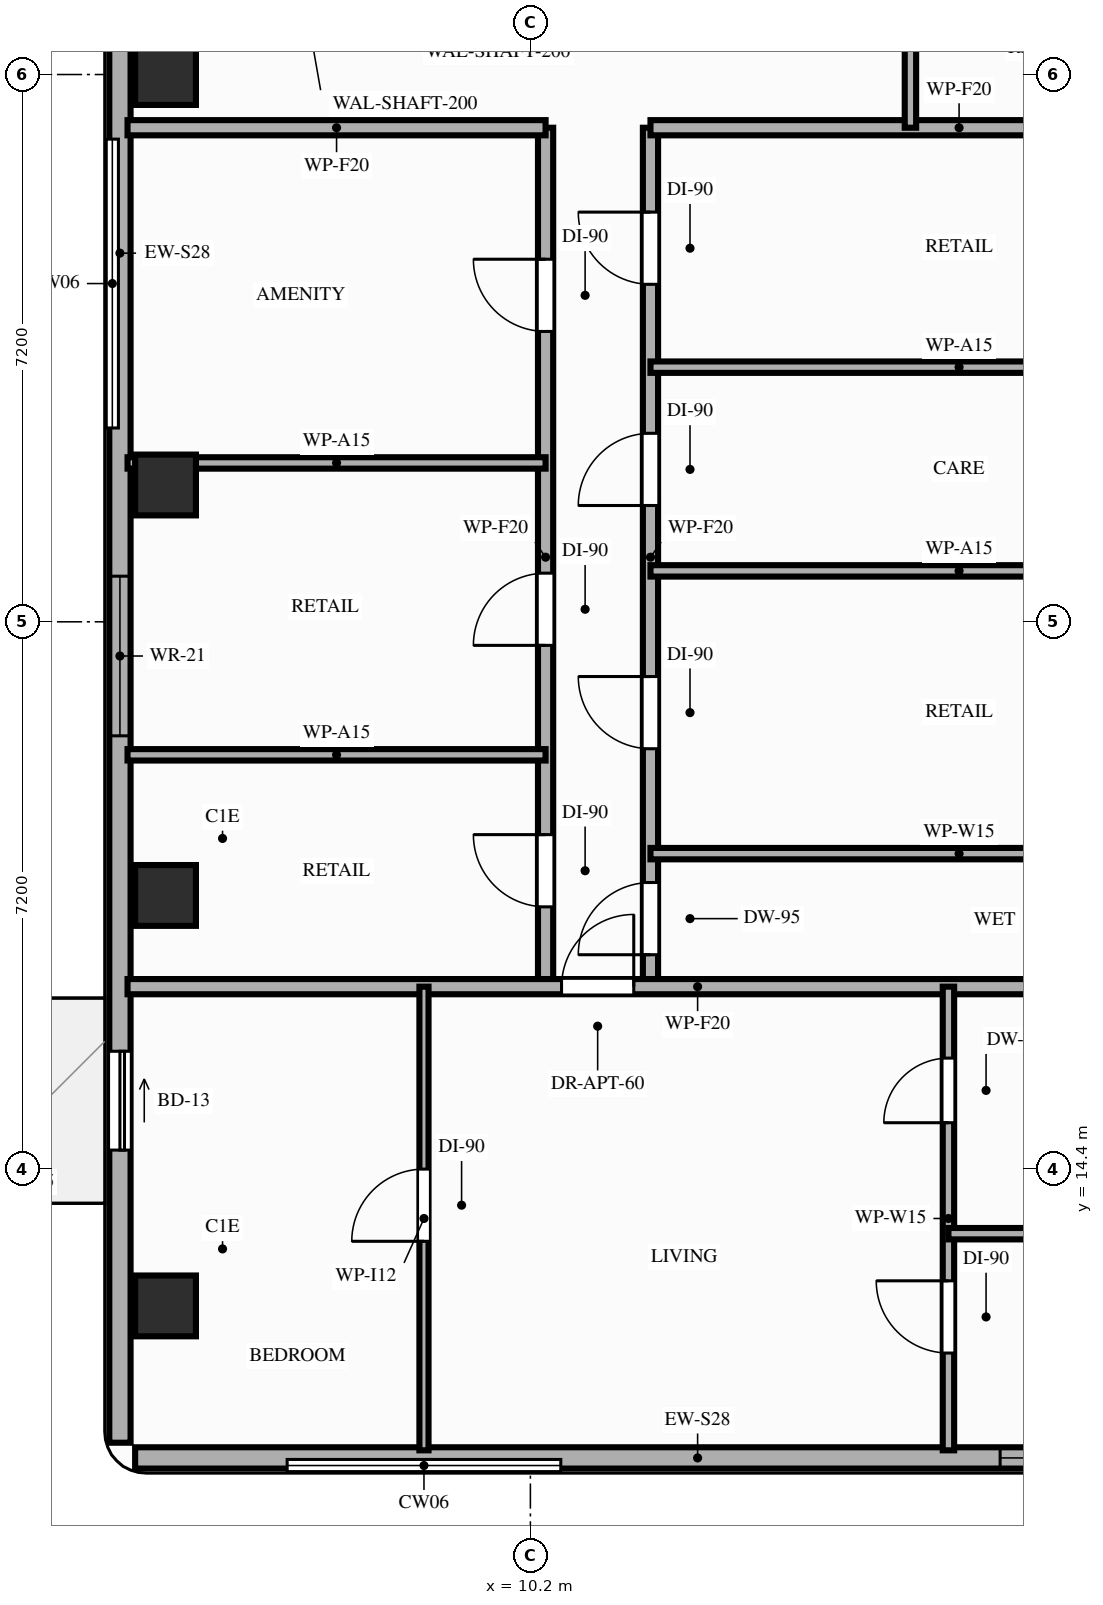
"""IFC4 building model, lengths in metres.
Left out: names, types, materials, properties, quantities, classifications, styles, units other than length and angle.
Written with IfcOpenShell. Run it as: python <this file> out.ifc"""

import sys

from ifc_helpers import new_model, si_unit, direction, frame, frame_2d, origin, origin_2d, place, context, subcontext, project, spatial, rectangle, extrude, element, fill, save


model = new_model("IFC4")
c1 = context("Model", 3, precision=1e-05, world=origin(), true_north=direction((0.0, 1.0)))
c2 = subcontext(c1, "Body", "Model", "MODEL_VIEW")
j1 = project(units=[si_unit("LENGTHUNIT", "METRE"), si_unit("PLANEANGLEUNIT", "RADIAN")], contexts=[c1])
p1 = place(None, origin())
s1 = spatial("IfcSite", under=j1, at=p1, CompositionType="ELEMENT")
p2 = place(p1, origin())
s2 = spatial("IfcBuilding", under=s1, at=p2, CompositionType="ELEMENT")
p3 = place(p2, frame((0.0, 0.0, 234.4)))
s3 = spatial("IfcBuildingStorey", under=s2, at=p3, CompositionType="ELEMENT", Elevation=234.4)
for number, where, z_axis, x_axis in (
    (1, (5.4, 12.6, 0.0), (0.0, 0.0, 1.0), (1.0, 0.0, 0.0)),
    (2, (5.4, 18.0, 0.0), (0.0, 0.0, 1.0), (1.0, 0.0, 0.0)),
    (3, (5.4, 23.4, 0.0), (0.0, 0.0, 1.0), (1.0, 0.0, 0.0)),
    (4, (5.4, 28.8, 0.0), (0.0, 0.0, 1.0), (1.0, 0.0, 0.0)),
):
    element("IfcColumn", number, at=place(p3, frame(where, z_axis=z_axis, x_axis=x_axis)), inside=s3, PredefinedType="COLUMN", context=c2, shape_type="SweptSolid", body=[
        extrude(rectangle(XDim=0.8, YDim=0.8, at=origin_2d()), origin(), (0.0, 0.0, 1.0), 3.2),
    ])
p4 = place(p3, frame((5.0, 10.6, 0.0), z_axis=(0.0, 0.0, 1.0), x_axis=(1.0, 0.0, 0.0)))
e5 = element("IfcWall", 5, at=p4, inside=s3, PredefinedType="STANDARD", context=c2, shape_type="SweptSolid", body=[
    extrude(rectangle(XDim=14.8, YDim=0.28, at=frame_2d((7.4, 0.0))), origin(), (0.0, 0.0, 1.0), 3.02),
])
p5 = place(p4, frame((11.38, 0.0, 0.85)))
e6 = element("IfcOpeningElement", 6, at=p5, cuts=e5, PredefinedType="OPENING", context=c2, shape_type="SweptSolid", body=[
    extrude(rectangle(XDim=2.6, YDim=1.92, at=frame_2d((1.3, 0.96))), frame((0.0, 0.15, 0.0), z_axis=(0.0, -1.0, 0.0), x_axis=(1.0, 0.0, 0.0)), (0.0, 0.0, 1.0), 0.3),
])
p6 = place(p3, frame((4.8, 42.1, 0.0), z_axis=(0.0, 0.0, 1.0), x_axis=(0.0, -1.0, 0.0)))
e7 = element("IfcWall", 7, at=p6, inside=s3, PredefinedType="STANDARD", context=c2, shape_type="SweptSolid", body=[
    extrude(rectangle(XDim=31.3, YDim=0.28, at=frame_2d((15.65, 0.0))), origin(), (0.0, 0.0, 1.0), 2.71),
])
p7 = place(p6, frame((26.15, 0.0, 0.0)))
e8 = element("IfcOpeningElement", 8, at=p7, cuts=e7, PredefinedType="OPENING", context=c2, shape_type="SweptSolid", body=[
    extrude(rectangle(XDim=1.3, YDim=2.08, at=frame_2d((0.65, 1.04))), frame((0.0, 0.15, 0.0), z_axis=(0.0, -1.0, 0.0), x_axis=(1.0, 0.0, 0.0)), (0.0, 0.0, 1.0), 0.3),
])
p8 = place(p6, frame((19.9, 0.0, 0.85)))
e9 = element("IfcOpeningElement", 9, at=p8, cuts=e7, PredefinedType="OPENING", context=c2, shape_type="SweptSolid", body=[
    extrude(rectangle(XDim=2.1, YDim=1.61, at=frame_2d((1.05, 0.805))), frame((0.0, 0.15, 0.0), z_axis=(0.0, -1.0, 0.0), x_axis=(1.0, 0.0, 0.0)), (0.0, 0.0, 1.0), 0.3),
])
p9 = place(p6, frame((9.5, 0.0, 0.85)))
e10 = element("IfcOpeningElement", 10, at=p9, cuts=e7, PredefinedType="OPENING", context=c2, shape_type="SweptSolid", body=[
    extrude(rectangle(XDim=2.6, YDim=1.61, at=frame_2d((1.3, 0.805))), frame((0.0, 0.15, 0.0), z_axis=(0.0, -1.0, 0.0), x_axis=(1.0, 0.0, 0.0)), (0.0, 0.0, 1.0), 0.3),
])
p10 = place(p6, frame((3.4, 0.0, 0.85)))
e11 = element("IfcOpeningElement", 11, at=p10, cuts=e7, PredefinedType="OPENING", context=c2, shape_type="SweptSolid", body=[
    extrude(rectangle(XDim=2.6, YDim=1.61, at=frame_2d((1.3, 0.805))), frame((0.0, 0.15, 0.0), z_axis=(0.0, -1.0, 0.0), x_axis=(1.0, 0.0, 0.0)), (0.0, 0.0, 1.0), 0.3),
])
p11 = place(p3, frame((10.4, 16.8, 0.0), z_axis=(0.0, 0.0, 1.0), x_axis=(0.0, 1.0, 0.0)))
e12 = element("IfcWall", 12, at=p11, inside=s3, PredefinedType="PARTITIONING", context=c2, shape_type="SweptSolid", body=[
    extrude(rectangle(XDim=11.3, YDim=0.2, at=frame_2d((5.65, 0.0))), origin(), (0.0, 0.0, 1.0), 2.55),
])
p12 = place(p11, frame((1.05, 0.0, 0.0)))
e13 = element("IfcOpeningElement", 13, at=p12, cuts=e12, PredefinedType="OPENING", context=c2, shape_type="SweptSolid", body=[
    extrude(rectangle(XDim=0.95, YDim=2.15, at=frame_2d((0.475, 1.075))), frame((0.0, 0.11, 0.0), z_axis=(0.0, -1.0, 0.0), x_axis=(1.0, 0.0, 0.0)), (0.0, 0.0, 1.0), 0.22),
])
p13 = place(p11, frame((4.49, 0.0, 0.0)))
e14 = element("IfcOpeningElement", 14, at=p13, cuts=e12, PredefinedType="OPENING", context=c2, shape_type="SweptSolid", body=[
    extrude(rectangle(XDim=0.95, YDim=2.15, at=frame_2d((0.475, 1.075))), frame((0.0, 0.11, 0.0), z_axis=(0.0, -1.0, 0.0), x_axis=(1.0, 0.0, 0.0)), (0.0, 0.0, 1.0), 0.22),
])
p14 = place(p11, frame((8.62, 0.0, 0.0)))
e15 = element("IfcOpeningElement", 15, at=p14, cuts=e12, PredefinedType="OPENING", context=c2, shape_type="SweptSolid", body=[
    extrude(rectangle(XDim=0.95, YDim=2.15, at=frame_2d((0.475, 1.075))), frame((0.0, 0.11, 0.0), z_axis=(0.0, -1.0, 0.0), x_axis=(1.0, 0.0, 0.0)), (0.0, 0.0, 1.0), 0.22),
])
p15 = place(p3, frame((11.78, 16.8, 0.0), z_axis=(0.0, 0.0, 1.0), x_axis=(0.0, 1.0, 0.0)))
e16 = element("IfcWall", 16, at=p15, inside=s3, PredefinedType="PARTITIONING", context=c2, shape_type="SweptSolid", body=[
    extrude(rectangle(XDim=11.3, YDim=0.2, at=frame_2d((5.65, 0.0))), origin(), (0.0, 0.0, 1.0), 2.55),
])
p16 = place(p15, frame((0.42, 0.0, 0.0)))
e17 = element("IfcOpeningElement", 17, at=p16, cuts=e16, PredefinedType="OPENING", context=c2, shape_type="SweptSolid", body=[
    extrude(rectangle(XDim=0.95, YDim=2.1, at=frame_2d((0.475, 1.05))), frame((0.0, 0.11, 0.0), z_axis=(0.0, -1.0, 0.0), x_axis=(1.0, 0.0, 0.0)), (0.0, 0.0, 1.0), 0.22),
])
p17 = place(p15, frame((3.13, 0.0, 0.0)))
e18 = element("IfcOpeningElement", 18, at=p17, cuts=e16, PredefinedType="OPENING", context=c2, shape_type="SweptSolid", body=[
    extrude(rectangle(XDim=0.95, YDim=2.15, at=frame_2d((0.475, 1.075))), frame((0.0, 0.11, 0.0), z_axis=(0.0, -1.0, 0.0), x_axis=(1.0, 0.0, 0.0)), (0.0, 0.0, 1.0), 0.22),
])
p18 = place(p15, frame((6.33, 0.0, 0.0)))
e19 = element("IfcOpeningElement", 19, at=p18, cuts=e16, PredefinedType="OPENING", context=c2, shape_type="SweptSolid", body=[
    extrude(rectangle(XDim=0.95, YDim=2.15, at=frame_2d((0.475, 1.075))), frame((0.0, 0.11, 0.0), z_axis=(0.0, -1.0, 0.0), x_axis=(1.0, 0.0, 0.0)), (0.0, 0.0, 1.0), 0.22),
])
p19 = place(p15, frame((9.24, 0.0, 0.0)))
e20 = element("IfcOpeningElement", 20, at=p19, cuts=e16, PredefinedType="OPENING", context=c2, shape_type="SweptSolid", body=[
    extrude(rectangle(XDim=0.95, YDim=2.15, at=frame_2d((0.475, 1.075))), frame((0.0, 0.11, 0.0), z_axis=(0.0, -1.0, 0.0), x_axis=(1.0, 0.0, 0.0)), (0.0, 0.0, 1.0), 0.22),
])
p20 = place(p3, frame((4.9, 16.8, 0.0), z_axis=(0.0, 0.0, 1.0), x_axis=(1.0, 0.0, 0.0)))
e21 = element("IfcWall", 21, at=p20, inside=s3, PredefinedType="PARTITIONING", context=c2, shape_type="SweptSolid", body=[
    extrude(rectangle(XDim=15.0, YDim=0.2, at=frame_2d((7.5, 0.0))), origin(), (0.0, 0.0, 1.0), 2.55),
])
p21 = place(p20, frame((5.71, 0.0, 0.0)))
e22 = element("IfcOpeningElement", 22, at=p21, cuts=e21, PredefinedType="OPENING", context=c2, shape_type="SweptSolid", body=[
    extrude(rectangle(XDim=0.95, YDim=2.15, at=frame_2d((0.475, 1.075))), frame((0.0, 0.11, 0.0), z_axis=(0.0, -1.0, 0.0), x_axis=(1.0, 0.0, 0.0)), (0.0, 0.0, 1.0), 0.22),
])
p22 = place(p3, frame((4.9, 28.1, 0.0), z_axis=(0.0, 0.0, 1.0), x_axis=(1.0, 0.0, 0.0)))
e23 = element("IfcWall", 23, at=p22, inside=s3, PredefinedType="PARTITIONING", context=c2, shape_type="SweptSolid", body=[
    extrude(rectangle(XDim=5.5, YDim=0.2, at=frame_2d((2.75, 0.0))), origin(), (0.0, 0.0, 1.0), 2.55),
])
p23 = place(p3, frame((11.78, 28.1, 0.0), z_axis=(0.0, 0.0, 1.0), x_axis=(1.0, 0.0, 0.0)))
e24 = element("IfcWall", 24, at=p23, inside=s3, PredefinedType="PARTITIONING", context=c2, shape_type="SweptSolid", body=[
    extrude(rectangle(XDim=8.12, YDim=0.2, at=frame_2d((4.06, 0.0))), origin(), (0.0, 0.0, 1.0), 2.55),
])
p24 = place(p3, frame((15.2, 28.1, 0.0), z_axis=(0.0, 0.0, 1.0), x_axis=(0.0, 1.0, 0.0)))
e25 = element("IfcWall", 25, at=p24, inside=s3, PredefinedType="PARTITIONING", context=c2, shape_type="SweptSolid", body=[
    extrude(rectangle(XDim=3.05, YDim=0.15, at=frame_2d((1.525, 0.0))), origin(), (0.0, 0.0, 1.0), 2.55),
])
p25 = place(p3, frame((8.8, 10.7, 0.0), z_axis=(0.0, 0.0, 1.0), x_axis=(0.0, 1.0, 0.0)))
e26 = element("IfcWall", 26, at=p25, inside=s3, PredefinedType="PARTITIONING", context=c2, shape_type="SweptSolid", body=[
    extrude(rectangle(XDim=6.1, YDim=0.12, at=frame_2d((3.05, 0.0))), origin(), (0.0, 0.0, 1.0), 2.55),
])
p26 = place(p25, frame((2.75, 0.0, 0.0)))
e27 = element("IfcOpeningElement", 27, at=p26, cuts=e26, PredefinedType="OPENING", context=c2, shape_type="SweptSolid", body=[
    extrude(rectangle(XDim=0.95, YDim=2.15, at=frame_2d((0.475, 1.075))), frame((0.0, 0.07, 0.0), z_axis=(0.0, -1.0, 0.0), x_axis=(1.0, 0.0, 0.0)), (0.0, 0.0, 1.0), 0.14),
])
p27 = place(p3, frame((15.7, 10.7, 0.0), z_axis=(0.0, 0.0, 1.0), x_axis=(0.0, 1.0, 0.0)))
e28 = element("IfcWall", 28, at=p27, inside=s3, PredefinedType="PARTITIONING", context=c2, shape_type="SweptSolid", body=[
    extrude(rectangle(XDim=6.1, YDim=0.15, at=frame_2d((3.05, 0.0))), origin(), (0.0, 0.0, 1.0), 2.55),
])
p28 = place(p27, frame((1.28, 0.0, 0.0)))
e29 = element("IfcOpeningElement", 29, at=p28, cuts=e28, PredefinedType="OPENING", context=c2, shape_type="SweptSolid", body=[
    extrude(rectangle(XDim=0.95, YDim=2.15, at=frame_2d((0.475, 1.075))), frame((0.0, 0.085, 0.0), z_axis=(0.0, -1.0, 0.0), x_axis=(1.0, 0.0, 0.0)), (0.0, 0.0, 1.0), 0.17),
])
p29 = place(p27, frame((4.31, 0.0, 0.0)))
e30 = element("IfcOpeningElement", 30, at=p29, cuts=e28, PredefinedType="OPENING", context=c2, shape_type="SweptSolid", body=[
    extrude(rectangle(XDim=0.85, YDim=2.1, at=frame_2d((0.425, 1.05))), frame((0.0, 0.085, 0.0), z_axis=(0.0, -1.0, 0.0), x_axis=(1.0, 0.0, 0.0)), (0.0, 0.0, 1.0), 0.17),
])
p30 = place(p3, frame((15.7, 13.55, 0.0), z_axis=(0.0, 0.0, 1.0), x_axis=(1.0, 0.0, 0.0)))
e31 = element("IfcWall", 31, at=p30, inside=s3, PredefinedType="PARTITIONING", context=c2, shape_type="SweptSolid", body=[
    extrude(rectangle(XDim=4.2, YDim=0.15, at=frame_2d((2.1, 0.0))), origin(), (0.0, 0.0, 1.0), 2.55),
])
for number, where, z_axis, x_axis in (
    (32, (4.9, 19.85, 0.0), (0.0, 0.0, 1.0), (1.0, 0.0, 0.0)),
    (33, (4.9, 23.69, 0.0), (0.0, 0.0, 1.0), (1.0, 0.0, 0.0)),
):
    element("IfcWall", number, at=place(p3, frame(where, z_axis=z_axis, x_axis=x_axis)), inside=s3, PredefinedType="PARTITIONING", context=c2, shape_type="SweptSolid", body=[
        extrude(rectangle(XDim=5.5, YDim=0.15, at=frame_2d((2.75, 0.0))), origin(), (0.0, 0.0, 1.0), 2.55),
    ])
for number, where, z_axis, x_axis in (
    (34, (11.78, 18.55, 0.0), (0.0, 0.0, 1.0), (1.0, 0.0, 0.0)),
    (35, (11.78, 22.27, 0.0), (0.0, 0.0, 1.0), (1.0, 0.0, 0.0)),
    (36, (11.78, 24.95, 0.0), (0.0, 0.0, 1.0), (1.0, 0.0, 0.0)),
):
    element("IfcWall", number, at=place(p3, frame(where, z_axis=z_axis, x_axis=x_axis)), inside=s3, PredefinedType="PARTITIONING", context=c2, shape_type="SweptSolid", body=[
        extrude(rectangle(XDim=8.12, YDim=0.15, at=frame_2d((4.06, 0.0))), origin(), (0.0, 0.0, 1.0), 2.55),
    ])
p31 = place(p7, origin())
e37 = element("IfcDoor", 37, at=p31, inside=s3, OperationType="SLIDING_TO_LEFT", PredefinedType="DOOR", context=c2, shape_type="SweptSolid", body=[
    extrude(rectangle(XDim=1.3, YDim=2.08, at=frame_2d((0.65, 1.04))), frame((0.0, 0.025, 0.0), z_axis=(0.0, -1.0, 0.0), x_axis=(1.0, 0.0, 0.0)), (0.0, 0.0, 1.0), 0.05),
])
fill(e8, e37)
p32 = place(p5, origin())
e38 = element("IfcWindow", 38, at=p32, inside=s3, PartitioningType="SINGLE_PANEL", PredefinedType="WINDOW", context=c2, shape_type="SweptSolid", body=[
    extrude(rectangle(XDim=2.6, YDim=1.92, at=frame_2d((1.3, 0.96))), frame((0.0, 0.03, 0.0), z_axis=(0.0, -1.0, 0.0), x_axis=(1.0, 0.0, 0.0)), (0.0, 0.0, 1.0), 0.06),
])
fill(e6, e38)
p33 = place(p8, origin())
e39 = element("IfcWindow", 39, at=p33, inside=s3, PartitioningType="SINGLE_PANEL", PredefinedType="WINDOW", context=c2, shape_type="SweptSolid", body=[
    extrude(rectangle(XDim=2.1, YDim=1.61, at=frame_2d((1.05, 0.805))), frame((0.0, 0.03, 0.0), z_axis=(0.0, -1.0, 0.0), x_axis=(1.0, 0.0, 0.0)), (0.0, 0.0, 1.0), 0.06),
])
fill(e9, e39)
p34 = place(p21, origin())
e40 = element("IfcDoor", 40, at=p34, inside=s3, OperationType="SINGLE_SWING_RIGHT", PredefinedType="DOOR", context=c2, shape_type="SweptSolid", body=[
    extrude(rectangle(XDim=0.95, YDim=2.15, at=frame_2d((0.475, 1.075))), frame((0.0, 0.025, 0.0), z_axis=(0.0, -1.0, 0.0), x_axis=(1.0, 0.0, 0.0)), (0.0, 0.0, 1.0), 0.05),
])
fill(e22, e40)
p35 = place(p26, origin())
e41 = element("IfcDoor", 41, at=p35, inside=s3, OperationType="SINGLE_SWING_LEFT", PredefinedType="DOOR", context=c2, shape_type="SweptSolid", body=[
    extrude(rectangle(XDim=0.95, YDim=2.15, at=frame_2d((0.475, 1.075))), frame((0.0, 0.025, 0.0), z_axis=(0.0, -1.0, 0.0), x_axis=(1.0, 0.0, 0.0)), (0.0, 0.0, 1.0), 0.05),
])
fill(e27, e41)
p36 = place(p28, origin())
e42 = element("IfcDoor", 42, at=p36, inside=s3, OperationType="SINGLE_SWING_RIGHT", PredefinedType="DOOR", context=c2, shape_type="SweptSolid", body=[
    extrude(rectangle(XDim=0.95, YDim=2.15, at=frame_2d((0.475, 1.075))), frame((0.0, 0.025, 0.0), z_axis=(0.0, -1.0, 0.0), x_axis=(1.0, 0.0, 0.0)), (0.0, 0.0, 1.0), 0.05),
])
fill(e29, e42)
p37 = place(p29, origin())
e43 = element("IfcDoor", 43, at=p37, inside=s3, OperationType="SINGLE_SWING_LEFT", PredefinedType="DOOR", context=c2, shape_type="SweptSolid", body=[
    extrude(rectangle(XDim=0.85, YDim=2.1, at=frame_2d((0.425, 1.05))), frame((0.0, 0.025, 0.0), z_axis=(0.0, -1.0, 0.0), x_axis=(1.0, 0.0, 0.0)), (0.0, 0.0, 1.0), 0.05),
])
fill(e30, e43)
p38 = place(p12, origin())
e44 = element("IfcDoor", 44, at=p38, inside=s3, OperationType="SINGLE_SWING_RIGHT", PredefinedType="DOOR", context=c2, shape_type="SweptSolid", body=[
    extrude(rectangle(XDim=0.95, YDim=2.15, at=frame_2d((0.475, 1.075))), frame((0.0, 0.025, 0.0), z_axis=(0.0, -1.0, 0.0), x_axis=(1.0, 0.0, 0.0)), (0.0, 0.0, 1.0), 0.05),
])
fill(e13, e44)
p39 = place(p13, origin())
e45 = element("IfcDoor", 45, at=p39, inside=s3, OperationType="SINGLE_SWING_LEFT", PredefinedType="DOOR", context=c2, shape_type="SweptSolid", body=[
    extrude(rectangle(XDim=0.95, YDim=2.15, at=frame_2d((0.475, 1.075))), frame((0.0, 0.025, 0.0), z_axis=(0.0, -1.0, 0.0), x_axis=(1.0, 0.0, 0.0)), (0.0, 0.0, 1.0), 0.05),
])
fill(e14, e45)
p40 = place(p14, origin())
e46 = element("IfcDoor", 46, at=p40, inside=s3, OperationType="SINGLE_SWING_RIGHT", PredefinedType="DOOR", context=c2, shape_type="SweptSolid", body=[
    extrude(rectangle(XDim=0.95, YDim=2.15, at=frame_2d((0.475, 1.075))), frame((0.0, 0.025, 0.0), z_axis=(0.0, -1.0, 0.0), x_axis=(1.0, 0.0, 0.0)), (0.0, 0.0, 1.0), 0.05),
])
fill(e15, e46)
p41 = place(p16, origin())
e47 = element("IfcDoor", 47, at=p41, inside=s3, OperationType="SINGLE_SWING_LEFT", PredefinedType="DOOR", context=c2, shape_type="SweptSolid", body=[
    extrude(rectangle(XDim=0.95, YDim=2.1, at=frame_2d((0.475, 1.05))), frame((0.0, 0.025, 0.0), z_axis=(0.0, -1.0, 0.0), x_axis=(1.0, 0.0, 0.0)), (0.0, 0.0, 1.0), 0.05),
])
fill(e17, e47)
p42 = place(p17, origin())
e48 = element("IfcDoor", 48, at=p42, inside=s3, OperationType="SINGLE_SWING_RIGHT", PredefinedType="DOOR", context=c2, shape_type="SweptSolid", body=[
    extrude(rectangle(XDim=0.95, YDim=2.15, at=frame_2d((0.475, 1.075))), frame((0.0, 0.025, 0.0), z_axis=(0.0, -1.0, 0.0), x_axis=(1.0, 0.0, 0.0)), (0.0, 0.0, 1.0), 0.05),
])
fill(e18, e48)
p43 = place(p18, origin())
e49 = element("IfcDoor", 49, at=p43, inside=s3, OperationType="SINGLE_SWING_LEFT", PredefinedType="DOOR", context=c2, shape_type="SweptSolid", body=[
    extrude(rectangle(XDim=0.95, YDim=2.15, at=frame_2d((0.475, 1.075))), frame((0.0, 0.025, 0.0), z_axis=(0.0, -1.0, 0.0), x_axis=(1.0, 0.0, 0.0)), (0.0, 0.0, 1.0), 0.05),
])
fill(e19, e49)
p44 = place(p19, origin())
e50 = element("IfcDoor", 50, at=p44, inside=s3, OperationType="SINGLE_SWING_RIGHT", PredefinedType="DOOR", context=c2, shape_type="SweptSolid", body=[
    extrude(rectangle(XDim=0.95, YDim=2.15, at=frame_2d((0.475, 1.075))), frame((0.0, 0.025, 0.0), z_axis=(0.0, -1.0, 0.0), x_axis=(1.0, 0.0, 0.0)), (0.0, 0.0, 1.0), 0.05),
])
fill(e20, e50)
save(model, sys.argv[1])
